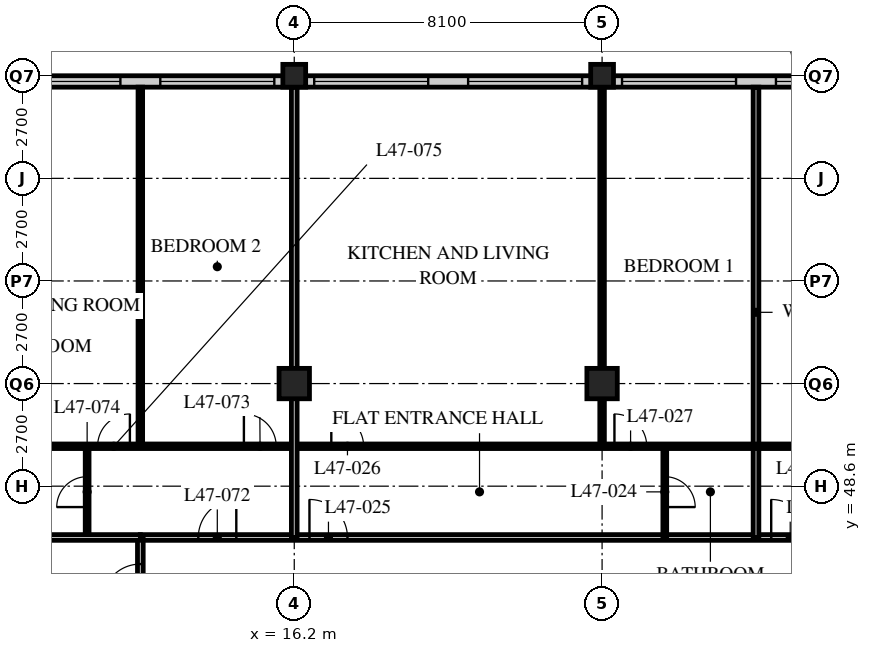
"""IFC4 building model, lengths in metres.
Left out: names, types, materials, properties, quantities, classifications, styles, units other than length and angle.
Written with IfcOpenShell. Run it as: python <this file> out.ifc"""

import sys

from ifc_helpers import new_model, si_unit, direction, frame, frame_2d, origin, origin_2d, place, context, subcontext, project, spatial, rectangle, hollow_rectangle, extrude, element, fill, save


model = new_model("IFC4")
c1 = context("Model", 3, precision=1e-05, world=origin(), true_north=direction((0.0, 1.0)))
c2 = subcontext(c1, "Body", "Model", "MODEL_VIEW")
j1 = project(units=[si_unit("LENGTHUNIT", "METRE"), si_unit("PLANEANGLEUNIT", "RADIAN")], contexts=[c1])
p1 = place(None, origin())
s1 = spatial("IfcSite", under=j1, at=p1, CompositionType="ELEMENT")
p2 = place(p1, origin())
s2 = spatial("IfcBuilding", under=s1, at=p2, CompositionType="ELEMENT")
p3 = place(p2, frame((0.0, 0.0, 184.8)))
s3 = spatial("IfcBuildingStorey", under=s2, at=p3, CompositionType="ELEMENT", Elevation=184.8)
p4 = place(p3, frame((16.2, 51.3, 0.0), z_axis=(0.0, 0.0, 1.0), x_axis=(1.0, 0.0, 0.0)))
e1 = element("IfcColumn", 1, at=p4, inside=s3, PredefinedType="COLUMN", context=c2, shape_type="SweptSolid", body=[
    extrude(hollow_rectangle(XDim=0.8, YDim=0.8, WallThickness=0.08, at=origin_2d()), origin(), (0.0, 0.0, 1.0), 3.6),
])
p5 = place(p3, frame((16.2, 59.4, 0.0), z_axis=(0.0, 0.0, 1.0), x_axis=(1.0, 0.0, 0.0)))
e2 = element("IfcColumn", 2, at=p5, inside=s3, PredefinedType="COLUMN", context=c2, shape_type="SweptSolid", body=[
    extrude(hollow_rectangle(XDim=0.6, YDim=0.6, WallThickness=0.05, at=origin_2d()), origin(), (0.0, 0.0, 1.0), 3.6),
])
p6 = place(p3, frame((24.3, 51.3, 0.0), z_axis=(0.0, 0.0, 1.0), x_axis=(1.0, 0.0, 0.0)))
e3 = element("IfcColumn", 3, at=p6, inside=s3, PredefinedType="COLUMN", context=c2, shape_type="SweptSolid", body=[
    extrude(hollow_rectangle(XDim=0.8, YDim=0.8, WallThickness=0.08, at=origin_2d()), origin(), (0.0, 0.0, 1.0), 3.6),
])
p7 = place(p3, frame((24.3, 59.4, 0.0), z_axis=(0.0, 0.0, 1.0), x_axis=(1.0, 0.0, 0.0)))
e4 = element("IfcColumn", 4, at=p7, inside=s3, PredefinedType="COLUMN", context=c2, shape_type="SweptSolid", body=[
    extrude(hollow_rectangle(XDim=0.6, YDim=0.6, WallThickness=0.05, at=origin_2d()), origin(), (0.0, 0.0, 1.0), 3.6),
])
p8 = place(p3, frame((48.3, 59.25, 0.0), z_axis=(0.0, 0.0, 1.0), x_axis=(-1.0, 0.0, 0.0)))
e5 = element("IfcWall", 5, at=p8, inside=s3, PredefinedType="SOLIDWALL", context=c2, shape_type="SweptSolid", body=[
    extrude(rectangle(XDim=40.2, YDim=0.3, at=frame_2d((20.1, 0.0))), origin(), (0.0, 0.0, 1.0), 3.39),
])
p9 = place(p8, frame((0.225, 0.0, 0.6)))
e6 = element("IfcOpeningElement", 6, at=p9, cuts=e5, PredefinedType="OPENING", context=c2, shape_type="SweptSolid", body=[
    extrude(rectangle(XDim=3.0, YDim=2.4, at=frame_2d((1.5, 1.2))), frame((0.0, 0.16, 0.0), z_axis=(0.0, -1.0, 0.0), x_axis=(1.0, 0.0, 0.0)), (0.0, 0.0, 1.0), 0.32),
])
p10 = place(p8, frame((4.275, 0.0, 0.6)))
e7 = element("IfcOpeningElement", 7, at=p10, cuts=e5, PredefinedType="OPENING", context=c2, shape_type="SweptSolid", body=[
    extrude(rectangle(XDim=3.0, YDim=2.4, at=frame_2d((1.5, 1.2))), frame((0.0, 0.16, 0.0), z_axis=(0.0, -1.0, 0.0), x_axis=(1.0, 0.0, 0.0)), (0.0, 0.0, 1.0), 0.32),
])
p11 = place(p8, frame((8.325, 0.0, 0.6)))
e8 = element("IfcOpeningElement", 8, at=p11, cuts=e5, PredefinedType="OPENING", context=c2, shape_type="SweptSolid", body=[
    extrude(rectangle(XDim=3.0, YDim=2.4, at=frame_2d((1.5, 1.2))), frame((0.0, 0.16, 0.0), z_axis=(0.0, -1.0, 0.0), x_axis=(1.0, 0.0, 0.0)), (0.0, 0.0, 1.0), 0.32),
])
p12 = place(p8, frame((12.375, 0.0, 0.6)))
e9 = element("IfcOpeningElement", 9, at=p12, cuts=e5, PredefinedType="OPENING", context=c2, shape_type="SweptSolid", body=[
    extrude(rectangle(XDim=3.0, YDim=2.4, at=frame_2d((1.5, 1.2))), frame((0.0, 0.16, 0.0), z_axis=(0.0, -1.0, 0.0), x_axis=(1.0, 0.0, 0.0)), (0.0, 0.0, 1.0), 0.32),
])
p13 = place(p8, frame((16.425, 0.0, 0.6)))
e10 = element("IfcOpeningElement", 10, at=p13, cuts=e5, PredefinedType="OPENING", context=c2, shape_type="SweptSolid", body=[
    extrude(rectangle(XDim=3.0, YDim=2.4, at=frame_2d((1.5, 1.2))), frame((0.0, 0.16, 0.0), z_axis=(0.0, -1.0, 0.0), x_axis=(1.0, 0.0, 0.0)), (0.0, 0.0, 1.0), 0.32),
])
p14 = place(p8, frame((20.475, 0.0, 0.6)))
e11 = element("IfcOpeningElement", 11, at=p14, cuts=e5, PredefinedType="OPENING", context=c2, shape_type="SweptSolid", body=[
    extrude(rectangle(XDim=3.0, YDim=2.4, at=frame_2d((1.5, 1.2))), frame((0.0, 0.16, 0.0), z_axis=(0.0, -1.0, 0.0), x_axis=(1.0, 0.0, 0.0)), (0.0, 0.0, 1.0), 0.32),
])
p15 = place(p8, frame((24.525, 0.0, 0.6)))
e12 = element("IfcOpeningElement", 12, at=p15, cuts=e5, PredefinedType="OPENING", context=c2, shape_type="SweptSolid", body=[
    extrude(rectangle(XDim=3.0, YDim=2.4, at=frame_2d((1.5, 1.2))), frame((0.0, 0.16, 0.0), z_axis=(0.0, -1.0, 0.0), x_axis=(1.0, 0.0, 0.0)), (0.0, 0.0, 1.0), 0.32),
])
p16 = place(p8, frame((28.575, 0.0, 0.6)))
e13 = element("IfcOpeningElement", 13, at=p16, cuts=e5, PredefinedType="OPENING", context=c2, shape_type="SweptSolid", body=[
    extrude(rectangle(XDim=3.0, YDim=2.4, at=frame_2d((1.5, 1.2))), frame((0.0, 0.16, 0.0), z_axis=(0.0, -1.0, 0.0), x_axis=(1.0, 0.0, 0.0)), (0.0, 0.0, 1.0), 0.32),
])
p17 = place(p8, frame((32.625, 0.0, 0.6)))
e14 = element("IfcOpeningElement", 14, at=p17, cuts=e5, PredefinedType="OPENING", context=c2, shape_type="SweptSolid", body=[
    extrude(rectangle(XDim=3.0, YDim=2.4, at=frame_2d((1.5, 1.2))), frame((0.0, 0.16, 0.0), z_axis=(0.0, -1.0, 0.0), x_axis=(1.0, 0.0, 0.0)), (0.0, 0.0, 1.0), 0.32),
])
p18 = place(p8, frame((36.675, 0.0, 0.6)))
e15 = element("IfcOpeningElement", 15, at=p18, cuts=e5, PredefinedType="OPENING", context=c2, shape_type="SweptSolid", body=[
    extrude(rectangle(XDim=3.0, YDim=2.4, at=frame_2d((1.5, 1.2))), frame((0.0, 0.16, 0.0), z_axis=(0.0, -1.0, 0.0), x_axis=(1.0, 0.0, 0.0)), (0.0, 0.0, 1.0), 0.32),
])
p19 = place(p3, frame((12.15, 47.25, 0.0), z_axis=(0.0, 0.0, 1.0), x_axis=(1.0, 0.0, 0.0)))
e16 = element("IfcWall", 16, at=p19, inside=s3, PredefinedType="PARTITIONING", context=c2, shape_type="SweptSolid", body=[
    extrude(rectangle(XDim=32.4, YDim=0.15, at=frame_2d((16.2, 0.0))), origin(), (0.0, 0.0, 1.0), 3.39),
])
p20 = place(p19, frame((4.45, 0.0, 0.0)))
e17 = element("IfcOpeningElement", 17, at=p20, cuts=e16, PredefinedType="OPENING", context=c2, shape_type="SweptSolid", body=[
    extrude(rectangle(XDim=1.0, YDim=2.1, at=frame_2d((0.5, 1.05))), frame((0.0, 0.085, 0.0), z_axis=(0.0, -1.0, 0.0), x_axis=(1.0, 0.0, 0.0)), (0.0, 0.0, 1.0), 0.17),
])
p21 = place(p19, frame((16.6, 0.0, 0.0)))
e18 = element("IfcOpeningElement", 18, at=p21, cuts=e16, PredefinedType="OPENING", context=c2, shape_type="SweptSolid", body=[
    extrude(rectangle(XDim=1.0, YDim=2.1, at=frame_2d((0.5, 1.05))), frame((0.0, 0.085, 0.0), z_axis=(0.0, -1.0, 0.0), x_axis=(1.0, 0.0, 0.0)), (0.0, 0.0, 1.0), 0.17),
])
p22 = place(p19, frame((29.875, 0.0, 0.0)))
e19 = element("IfcOpeningElement", 19, at=p22, cuts=e16, PredefinedType="OPENING", context=c2, shape_type="SweptSolid", body=[
    extrude(rectangle(XDim=1.0, YDim=2.1, at=frame_2d((0.5, 1.05))), frame((0.0, 0.085, 0.0), z_axis=(0.0, -1.0, 0.0), x_axis=(1.0, 0.0, 0.0)), (0.0, 0.0, 1.0), 0.17),
])
p23 = place(p19, frame((1.525, 0.0, 0.0)))
e20 = element("IfcOpeningElement", 20, at=p23, cuts=e16, PredefinedType="OPENING", context=c2, shape_type="SweptSolid", body=[
    extrude(rectangle(XDim=1.0, YDim=2.1, at=frame_2d((0.5, 1.05))), frame((0.0, 0.085, 0.0), z_axis=(0.0, -1.0, 0.0), x_axis=(1.0, 0.0, 0.0)), (0.0, 0.0, 1.0), 0.17),
])
p24 = place(p3, frame((12.15, 18.9, 0.0), z_axis=(0.0, 0.0, 1.0), x_axis=(0.0, 1.0, 0.0)))
e21 = element("IfcWall", 21, at=p24, inside=s3, PredefinedType="PARTITIONING", context=c2, shape_type="SweptSolid", body=[
    extrude(rectangle(XDim=28.35, YDim=0.15, at=frame_2d((14.175, 0.0))), origin(), (0.0, 0.0, 1.0), 3.39),
])
p25 = place(p24, frame((2.35, 0.0, 0.0)))
e22 = element("IfcOpeningElement", 22, at=p25, cuts=e21, PredefinedType="OPENING", context=c2, shape_type="SweptSolid", body=[
    extrude(rectangle(XDim=1.0, YDim=2.1, at=frame_2d((0.5, 1.05))), frame((0.0, 0.085, 0.0), z_axis=(0.0, -1.0, 0.0), x_axis=(1.0, 0.0, 0.0)), (0.0, 0.0, 1.0), 0.17),
])
p26 = place(p24, frame((6.4, 0.0, 0.0)))
e23 = element("IfcOpeningElement", 23, at=p26, cuts=e21, PredefinedType="OPENING", context=c2, shape_type="SweptSolid", body=[
    extrude(rectangle(XDim=1.0, YDim=2.1, at=frame_2d((0.5, 1.05))), frame((0.0, 0.085, 0.0), z_axis=(0.0, -1.0, 0.0), x_axis=(1.0, 0.0, 0.0)), (0.0, 0.0, 1.0), 0.17),
])
p27 = place(p24, frame((8.5, 0.0, 0.0)))
e24 = element("IfcOpeningElement", 24, at=p27, cuts=e21, PredefinedType="OPENING", context=c2, shape_type="SweptSolid", body=[
    extrude(rectangle(XDim=1.0, YDim=2.1, at=frame_2d((0.5, 1.05))), frame((0.0, 0.085, 0.0), z_axis=(0.0, -1.0, 0.0), x_axis=(1.0, 0.0, 0.0)), (0.0, 0.0, 1.0), 0.17),
])
p28 = place(p24, frame((16.6, 0.0, 0.0)))
e25 = element("IfcOpeningElement", 25, at=p28, cuts=e21, PredefinedType="OPENING", context=c2, shape_type="SweptSolid", body=[
    extrude(rectangle(XDim=1.0, YDim=2.1, at=frame_2d((0.5, 1.05))), frame((0.0, 0.085, 0.0), z_axis=(0.0, -1.0, 0.0), x_axis=(1.0, 0.0, 0.0)), (0.0, 0.0, 1.0), 0.17),
])
p29 = place(p24, frame((26.65, 0.0, 0.0)))
e26 = element("IfcOpeningElement", 26, at=p29, cuts=e21, PredefinedType="OPENING", context=c2, shape_type="SweptSolid", body=[
    extrude(rectangle(XDim=1.0, YDim=2.1, at=frame_2d((0.5, 1.05))), frame((0.0, 0.085, 0.0), z_axis=(0.0, -1.0, 0.0), x_axis=(1.0, 0.0, 0.0)), (0.0, 0.0, 1.0), 0.17),
])
p30 = place(p3, frame((25.95, 47.25, 0.0), z_axis=(0.0, 0.0, 1.0), x_axis=(0.0, 1.0, 0.0)))
e27 = element("IfcWall", 27, at=p30, inside=s3, PredefinedType="PARTITIONING", context=c2, shape_type="SweptSolid", body=[
    extrude(rectangle(XDim=2.4, YDim=0.1, at=frame_2d((1.2, 0.0))), origin(), (0.0, 0.0, 1.0), 3.39),
])
p31 = place(p30, frame((0.8, 0.0, 0.0)))
e28 = element("IfcOpeningElement", 28, at=p31, cuts=e27, PredefinedType="OPENING", context=c2, shape_type="SweptSolid", body=[
    extrude(rectangle(XDim=0.8, YDim=2.1, at=frame_2d((0.4, 1.05))), frame((0.0, 0.06, 0.0), z_axis=(0.0, -1.0, 0.0), x_axis=(1.0, 0.0, 0.0)), (0.0, 0.0, 1.0), 0.12),
])
p32 = place(p3, frame((24.3, 49.65, 0.0), z_axis=(0.0, 0.0, 1.0), x_axis=(0.0, 1.0, 0.0)))
e29 = element("IfcWall", 29, at=p32, inside=s3, PredefinedType="PARTITIONING", context=c2, shape_type="SweptSolid", body=[
    extrude(rectangle(XDim=9.45, YDim=0.12, at=frame_2d((4.725, 0.0))), origin(), (0.0, 0.0, 1.0), 2.778),
])
p33 = place(p3, frame((28.35, 47.25, 0.0), z_axis=(0.0, 0.0, 1.0), x_axis=(0.0, 1.0, 0.0)))
e30 = element("IfcWall", 30, at=p33, inside=s3, PredefinedType="PARTITIONING", context=c2, shape_type="SweptSolid", body=[
    extrude(rectangle(XDim=11.85, YDim=0.15, at=frame_2d((5.925, 0.0))), origin(), (0.0, 0.0, 1.0), 3.39),
])
p34 = place(p3, frame((10.75, 47.25, 0.0), z_axis=(0.0, 0.0, 1.0), x_axis=(0.0, 1.0, 0.0)))
e31 = element("IfcWall", 31, at=p34, inside=s3, PredefinedType="PARTITIONING", context=c2, shape_type="SweptSolid", body=[
    extrude(rectangle(XDim=2.4, YDim=0.1, at=frame_2d((1.2, 0.0))), origin(), (0.0, 0.0, 1.0), 3.39),
])
p35 = place(p34, frame((0.8, 0.0, 0.0)))
e32 = element("IfcOpeningElement", 32, at=p35, cuts=e31, PredefinedType="OPENING", context=c2, shape_type="SweptSolid", body=[
    extrude(rectangle(XDim=0.8, YDim=2.1, at=frame_2d((0.4, 1.05))), frame((0.0, 0.06, 0.0), z_axis=(0.0, -1.0, 0.0), x_axis=(1.0, 0.0, 0.0)), (0.0, 0.0, 1.0), 0.12),
])
p36 = place(p3, frame((8.15, 49.65, 0.0), z_axis=(0.0, 0.0, 1.0), x_axis=(1.0, 0.0, 0.0)))
e33 = element("IfcWall", 33, at=p36, inside=s3, PredefinedType="PARTITIONING", context=c2, shape_type="SweptSolid", body=[
    extrude(rectangle(XDim=40.4, YDim=0.12, at=frame_2d((20.2, 0.0))), origin(), (0.0, 0.0, 1.0), 3.39),
])
p37 = place(p36, frame((9.025, 0.0, 0.0)))
e34 = element("IfcOpeningElement", 34, at=p37, cuts=e33, PredefinedType="OPENING", context=c2, shape_type="SweptSolid", body=[
    extrude(rectangle(XDim=0.85, YDim=2.1, at=frame_2d((0.425, 1.05))), frame((0.0, 0.07, 0.0), z_axis=(0.0, -1.0, 0.0), x_axis=(1.0, 0.0, 0.0)), (0.0, 0.0, 1.0), 0.14),
])
p38 = place(p36, frame((16.475, 0.0, 0.0)))
e35 = element("IfcOpeningElement", 35, at=p38, cuts=e33, PredefinedType="OPENING", context=c2, shape_type="SweptSolid", body=[
    extrude(rectangle(XDim=0.85, YDim=2.1, at=frame_2d((0.425, 1.05))), frame((0.0, 0.07, 0.0), z_axis=(0.0, -1.0, 0.0), x_axis=(1.0, 0.0, 0.0)), (0.0, 0.0, 1.0), 0.14),
])
p39 = place(p36, frame((21.175, 0.0, 0.0)))
e36 = element("IfcOpeningElement", 36, at=p39, cuts=e33, PredefinedType="OPENING", context=c2, shape_type="SweptSolid", body=[
    extrude(rectangle(XDim=0.85, YDim=2.1, at=frame_2d((0.425, 1.05))), frame((0.0, 0.07, 0.0), z_axis=(0.0, -1.0, 0.0), x_axis=(1.0, 0.0, 0.0)), (0.0, 0.0, 1.0), 0.14),
])
p40 = place(p36, frame((28.625, 0.0, 0.0)))
e37 = element("IfcOpeningElement", 37, at=p40, cuts=e33, PredefinedType="OPENING", context=c2, shape_type="SweptSolid", body=[
    extrude(rectangle(XDim=0.85, YDim=2.1, at=frame_2d((0.425, 1.05))), frame((0.0, 0.07, 0.0), z_axis=(0.0, -1.0, 0.0), x_axis=(1.0, 0.0, 0.0)), (0.0, 0.0, 1.0), 0.14),
])
p41 = place(p36, frame((32.825, 0.0, 0.0)))
e38 = element("IfcOpeningElement", 38, at=p41, cuts=e33, PredefinedType="OPENING", context=c2, shape_type="SweptSolid", body=[
    extrude(rectangle(XDim=0.85, YDim=2.1, at=frame_2d((0.425, 1.05))), frame((0.0, 0.07, 0.0), z_axis=(0.0, -1.0, 0.0), x_axis=(1.0, 0.0, 0.0)), (0.0, 0.0, 1.0), 0.14),
])
p42 = place(p36, frame((36.675, 0.0, 0.0)))
e39 = element("IfcOpeningElement", 39, at=p42, cuts=e33, PredefinedType="OPENING", context=c2, shape_type="SweptSolid", body=[
    extrude(rectangle(XDim=0.85, YDim=2.1, at=frame_2d((0.425, 1.05))), frame((0.0, 0.07, 0.0), z_axis=(0.0, -1.0, 0.0), x_axis=(1.0, 0.0, 0.0)), (0.0, 0.0, 1.0), 0.14),
])
p43 = place(p36, frame((6.725, 0.0, 0.0)))
e40 = element("IfcOpeningElement", 40, at=p43, cuts=e33, PredefinedType="OPENING", context=c2, shape_type="SweptSolid", body=[
    extrude(rectangle(XDim=0.85, YDim=2.1, at=frame_2d((0.425, 1.05))), frame((0.0, 0.07, 0.0), z_axis=(0.0, -1.0, 0.0), x_axis=(1.0, 0.0, 0.0)), (0.0, 0.0, 1.0), 0.14),
])
p44 = place(p36, frame((2.875, 0.0, 0.0)))
e41 = element("IfcOpeningElement", 41, at=p44, cuts=e33, PredefinedType="OPENING", context=c2, shape_type="SweptSolid", body=[
    extrude(rectangle(XDim=0.85, YDim=2.1, at=frame_2d((0.425, 1.05))), frame((0.0, 0.07, 0.0), z_axis=(0.0, -1.0, 0.0), x_axis=(1.0, 0.0, 0.0)), (0.0, 0.0, 1.0), 0.14),
])
p45 = place(p3, frame((12.15, 49.65, 0.0), z_axis=(0.0, 0.0, 1.0), x_axis=(0.0, 1.0, 0.0)))
e42 = element("IfcWall", 42, at=p45, inside=s3, PredefinedType="PARTITIONING", context=c2, shape_type="SweptSolid", body=[
    extrude(rectangle(XDim=9.45, YDim=0.12, at=frame_2d((4.725, 0.0))), origin(), (0.0, 0.0, 1.0), 3.39),
])
p46 = place(p3, frame((0.3, 47.25, 0.0), z_axis=(0.0, 0.0, 1.0), x_axis=(1.0, 0.0, 0.0)))
e43 = element("IfcWall", 43, at=p46, inside=s3, PredefinedType="PARTITIONING", context=c2, shape_type="SweptSolid", body=[
    extrude(rectangle(XDim=11.85, YDim=0.15, at=frame_2d((5.925, 0.0))), origin(), (0.0, 0.0, 1.0), 3.39),
])
p47 = place(p3, frame((16.2, 47.25, 0.0), z_axis=(0.0, 0.0, 1.0), x_axis=(0.0, 1.0, 0.0)))
e44 = element("IfcWall", 44, at=p47, inside=s3, PredefinedType="PARTITIONING", context=c2, shape_type="SweptSolid", body=[
    extrude(rectangle(XDim=11.85, YDim=0.15, at=frame_2d((5.925, 0.0))), origin(), (0.0, 0.0, 1.0), 2.778),
])
p48 = place(p13, origin())
e45 = element("IfcWindow", 45, at=p48, inside=s3, PartitioningType="SINGLE_PANEL", PredefinedType="WINDOW", context=c2, shape_type="SweptSolid", body=[
    extrude(rectangle(XDim=3.0, YDim=2.4, at=frame_2d((1.5, 1.2))), frame((0.0, 0.03, 0.0), z_axis=(0.0, -1.0, 0.0), x_axis=(1.0, 0.0, 0.0)), (0.0, 0.0, 1.0), 0.06),
])
fill(e10, e45)
p49 = place(p14, origin())
e46 = element("IfcWindow", 46, at=p49, inside=s3, PartitioningType="SINGLE_PANEL", PredefinedType="WINDOW", context=c2, shape_type="SweptSolid", body=[
    extrude(rectangle(XDim=3.0, YDim=2.4, at=frame_2d((1.5, 1.2))), frame((0.0, 0.03, 0.0), z_axis=(0.0, -1.0, 0.0), x_axis=(1.0, 0.0, 0.0)), (0.0, 0.0, 1.0), 0.06),
])
fill(e11, e46)
p50 = place(p15, origin())
e47 = element("IfcWindow", 47, at=p50, inside=s3, PartitioningType="SINGLE_PANEL", PredefinedType="WINDOW", context=c2, shape_type="SweptSolid", body=[
    extrude(rectangle(XDim=3.0, YDim=2.4, at=frame_2d((1.5, 1.2))), frame((0.0, 0.03, 0.0), z_axis=(0.0, -1.0, 0.0), x_axis=(1.0, 0.0, 0.0)), (0.0, 0.0, 1.0), 0.06),
])
fill(e12, e47)
p51 = place(p16, origin())
e48 = element("IfcWindow", 48, at=p51, inside=s3, PartitioningType="SINGLE_PANEL", PredefinedType="WINDOW", context=c2, shape_type="SweptSolid", body=[
    extrude(rectangle(XDim=3.0, YDim=2.4, at=frame_2d((1.5, 1.2))), frame((0.0, 0.03, 0.0), z_axis=(0.0, -1.0, 0.0), x_axis=(1.0, 0.0, 0.0)), (0.0, 0.0, 1.0), 0.06),
])
fill(e13, e48)
p52 = place(p17, origin())
e49 = element("IfcWindow", 49, at=p52, inside=s3, PartitioningType="SINGLE_PANEL", PredefinedType="WINDOW", context=c2, shape_type="SweptSolid", body=[
    extrude(rectangle(XDim=3.0, YDim=2.4, at=frame_2d((1.5, 1.2))), frame((0.0, 0.03, 0.0), z_axis=(0.0, -1.0, 0.0), x_axis=(1.0, 0.0, 0.0)), (0.0, 0.0, 1.0), 0.06),
])
fill(e14, e49)
p53 = place(p18, origin())
e50 = element("IfcWindow", 50, at=p53, inside=s3, PartitioningType="SINGLE_PANEL", PredefinedType="WINDOW", context=c2, shape_type="SweptSolid", body=[
    extrude(rectangle(XDim=3.0, YDim=2.4, at=frame_2d((1.5, 1.2))), frame((0.0, 0.03, 0.0), z_axis=(0.0, -1.0, 0.0), x_axis=(1.0, 0.0, 0.0)), (0.0, 0.0, 1.0), 0.06),
])
fill(e15, e50)
p54 = place(p31, origin())
e51 = element("IfcDoor", 51, at=p54, inside=s3, OperationType="SINGLE_SWING_RIGHT", PredefinedType="DOOR", context=c2, shape_type="SweptSolid", body=[
    extrude(rectangle(XDim=0.8, YDim=2.1, at=frame_2d((0.4, 1.05))), frame((0.0, 0.025, 0.0), z_axis=(0.0, -1.0, 0.0), x_axis=(1.0, 0.0, 0.0)), (0.0, 0.0, 1.0), 0.05),
])
fill(e28, e51)
p55 = place(p20, origin())
e52 = element("IfcDoor", 52, at=p55, inside=s3, OperationType="SINGLE_SWING_LEFT", PredefinedType="DOOR", context=c2, shape_type="SweptSolid", body=[
    extrude(rectangle(XDim=1.0, YDim=2.1, at=frame_2d((0.5, 1.05))), frame((0.0, 0.025, 0.0), z_axis=(0.0, -1.0, 0.0), x_axis=(1.0, 0.0, 0.0)), (0.0, 0.0, 1.0), 0.05),
])
fill(e17, e52)
p56 = place(p37, origin())
e53 = element("IfcDoor", 53, at=p56, inside=s3, OperationType="SINGLE_SWING_LEFT", PredefinedType="DOOR", context=c2, shape_type="SweptSolid", body=[
    extrude(rectangle(XDim=0.85, YDim=2.1, at=frame_2d((0.425, 1.05))), frame((0.0, 0.025, 0.0), z_axis=(0.0, -1.0, 0.0), x_axis=(1.0, 0.0, 0.0)), (0.0, 0.0, 1.0), 0.05),
])
fill(e34, e53)
p57 = place(p38, origin())
e54 = element("IfcDoor", 54, at=p57, inside=s3, OperationType="SINGLE_SWING_LEFT", PredefinedType="DOOR", context=c2, shape_type="SweptSolid", body=[
    extrude(rectangle(XDim=0.85, YDim=2.1, at=frame_2d((0.425, 1.05))), frame((0.0, 0.025, 0.0), z_axis=(0.0, -1.0, 0.0), x_axis=(1.0, 0.0, 0.0)), (0.0, 0.0, 1.0), 0.05),
])
fill(e35, e54)
p58 = place(p21, origin())
e55 = element("IfcDoor", 55, at=p58, inside=s3, OperationType="SINGLE_SWING_LEFT", PredefinedType="DOOR", context=c2, shape_type="SweptSolid", body=[
    extrude(rectangle(XDim=1.0, YDim=2.1, at=frame_2d((0.5, 1.05))), frame((0.0, 0.025, 0.0), z_axis=(0.0, -1.0, 0.0), x_axis=(1.0, 0.0, 0.0)), (0.0, 0.0, 1.0), 0.05),
])
fill(e18, e55)
p59 = place(p29, origin())
e56 = element("IfcDoor", 56, at=p59, inside=s3, OperationType="SINGLE_SWING_LEFT", PredefinedType="DOOR", context=c2, shape_type="SweptSolid", body=[
    extrude(rectangle(XDim=1.0, YDim=2.1, at=frame_2d((0.5, 1.05))), frame((0.0, 0.025, 0.0), z_axis=(0.0, -1.0, 0.0), x_axis=(1.0, 0.0, 0.0)), (0.0, 0.0, 1.0), 0.05),
])
fill(e26, e56)
p60 = place(p23, origin())
e57 = element("IfcDoor", 57, at=p60, inside=s3, OperationType="SINGLE_SWING_RIGHT", PredefinedType="DOOR", context=c2, shape_type="SweptSolid", body=[
    extrude(rectangle(XDim=1.0, YDim=2.1, at=frame_2d((0.5, 1.05))), frame((0.0, 0.025, 0.0), z_axis=(0.0, -1.0, 0.0), x_axis=(1.0, 0.0, 0.0)), (0.0, 0.0, 1.0), 0.05),
])
fill(e20, e57)
p61 = place(p43, origin())
e58 = element("IfcDoor", 58, at=p61, inside=s3, OperationType="SINGLE_SWING_LEFT", PredefinedType="DOOR", context=c2, shape_type="SweptSolid", body=[
    extrude(rectangle(XDim=0.85, YDim=2.1, at=frame_2d((0.425, 1.05))), frame((0.0, 0.025, 0.0), z_axis=(0.0, -1.0, 0.0), x_axis=(1.0, 0.0, 0.0)), (0.0, 0.0, 1.0), 0.05),
])
fill(e40, e58)
p62 = place(p35, origin())
e59 = element("IfcDoor", 59, at=p62, inside=s3, OperationType="SINGLE_SWING_LEFT", PredefinedType="DOOR", context=c2, shape_type="SweptSolid", body=[
    extrude(rectangle(XDim=0.8, YDim=2.1, at=frame_2d((0.4, 1.05))), frame((0.0, 0.025, 0.0), z_axis=(0.0, -1.0, 0.0), x_axis=(1.0, 0.0, 0.0)), (0.0, 0.0, 1.0), 0.05),
])
fill(e32, e59)
p63 = place(p44, origin())
e60 = element("IfcDoor", 60, at=p63, inside=s3, OperationType="SINGLE_SWING_RIGHT", PredefinedType="DOOR", context=c2, shape_type="SweptSolid", body=[
    extrude(rectangle(XDim=0.85, YDim=2.1, at=frame_2d((0.425, 1.05))), frame((0.0, 0.025, 0.0), z_axis=(0.0, -1.0, 0.0), x_axis=(1.0, 0.0, 0.0)), (0.0, 0.0, 1.0), 0.05),
])
fill(e41, e60)
save(model, sys.argv[1])
